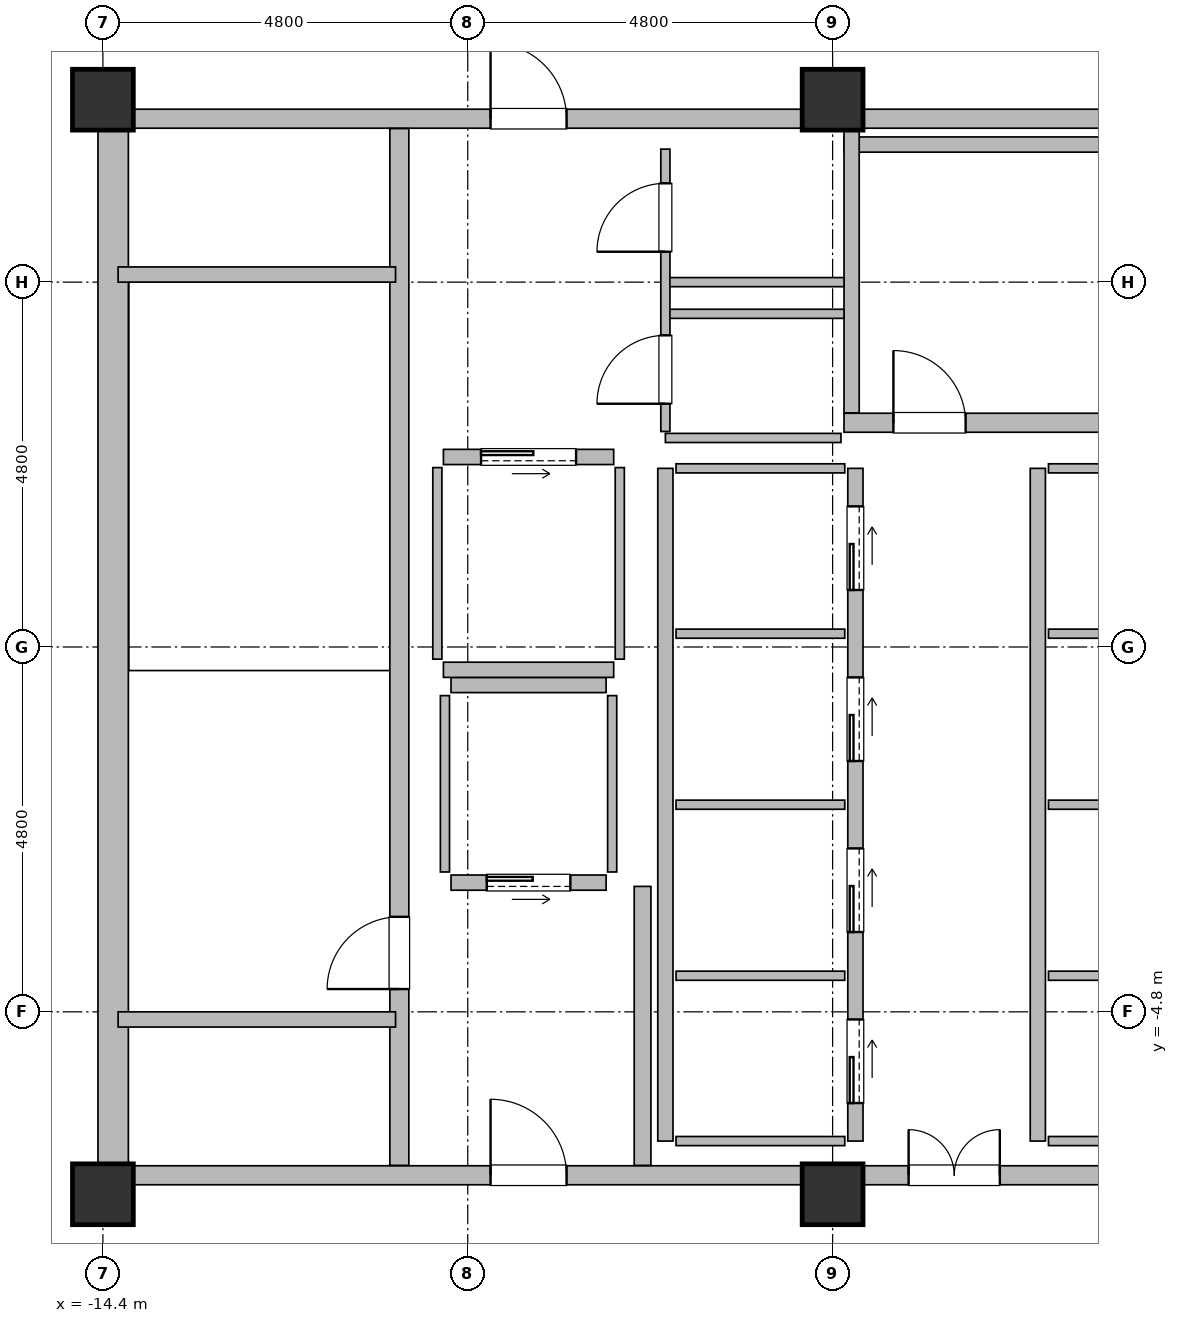
"""IFC4 building model, lengths in metres.
Left out: names, types, materials, properties, quantities, classifications, styles, units other than length and angle.
Written with IfcOpenShell. Run it as: python <this file> out.ifc"""

import sys

from ifc_helpers import new_model, si_unit, direction, frame, frame_2d, origin, origin_2d, place, context, subcontext, project, spatial, rectangle, hollow_rectangle, extrude, element, fill, save


model = new_model("IFC4")
c1 = context("Model", 3, precision=1e-05, world=origin(), true_north=direction((0.0, 1.0)))
c2 = subcontext(c1, "Body", "Model", "MODEL_VIEW")
j1 = project(units=[si_unit("LENGTHUNIT", "METRE"), si_unit("PLANEANGLEUNIT", "RADIAN")], contexts=[c1])
p1 = place(None, origin())
s1 = spatial("IfcSite", under=j1, at=p1, CompositionType="ELEMENT")
p2 = place(p1, origin())
s2 = spatial("IfcBuilding", under=s1, at=p2, CompositionType="ELEMENT")
p3 = place(p2, frame((0.0, 0.0, 48.5)))
s3 = spatial("IfcBuildingStorey", under=s2, at=p3, CompositionType="ELEMENT", Elevation=48.5)
for number, where, z_axis, x_axis in (
    (1, (-14.4, -7.2, 0.0), (0.0, 0.0, 1.0), (1.0, 0.0, 0.0)),
    (2, (-14.4, 7.2, 0.0), (0.0, 0.0, 1.0), (1.0, 0.0, 0.0)),
    (3, (-4.8, -7.2, 0.0), (0.0, 0.0, 1.0), (1.0, 0.0, 0.0)),
    (4, (-4.8, 7.2, 0.0), (0.0, 0.0, 1.0), (1.0, 0.0, 0.0)),
):
    element("IfcColumn", number, at=place(p3, frame(where, z_axis=z_axis, x_axis=x_axis)), inside=s3, PredefinedType="COLUMN", context=c2, shape_type="SweptSolid", body=[
        extrude(hollow_rectangle(XDim=0.8, YDim=0.8, WallThickness=0.036, at=origin_2d()), origin(), (0.0, 0.0, 1.0), 3.7),
    ])
p4 = place(p3, frame((-14.265, -7.2, -0.18), z_axis=(0.0, 0.0, 1.0), x_axis=(0.0, 1.0, 0.0)))
e5 = element("IfcWall", 5, at=p4, inside=s3, PredefinedType="SHEAR", context=c2, shape_type="SweptSolid", body=[
    extrude(rectangle(XDim=14.4, YDim=0.4, at=frame_2d((7.2, 0.0))), origin(), (0.0, 0.0, 1.0), 3.7),
])
p5 = place(p3, frame((-14.2, -6.95, 0.0), z_axis=(0.0, 0.0, 1.0), x_axis=(1.0, 0.0, 0.0)))
e6 = element("IfcWall", 6, at=p5, inside=s3, PredefinedType="SOLIDWALL", context=c2, shape_type="SweptSolid", body=[
    extrude(rectangle(XDim=9.4, YDim=0.25, at=frame_2d((4.7, 0.0))), origin(), (0.0, 0.0, 1.0), 2.62),
])
p6 = place(p5, frame((4.9, 0.0, 0.0)))
e7 = element("IfcOpeningElement", 7, at=p6, cuts=e6, PredefinedType="OPENING", context=c2, shape_type="SweptSolid", body=[
    extrude(rectangle(XDim=1.0, YDim=2.15, at=frame_2d((0.5, 1.075))), frame((0.0, 0.14, 0.0), z_axis=(0.0, -1.0, 0.0), x_axis=(1.0, 0.0, 0.0)), (0.0, 0.0, 1.0), 0.28),
])
p7 = place(p3, frame((-4.6, -6.95, 0.0), z_axis=(0.0, 0.0, 1.0), x_axis=(1.0, 0.0, 0.0)))
e8 = element("IfcWall", 8, at=p7, inside=s3, PredefinedType="SOLIDWALL", context=c2, shape_type="SweptSolid", body=[
    extrude(rectangle(XDim=9.2, YDim=0.25, at=frame_2d((4.6, 0.0))), origin(), (0.0, 0.0, 1.0), 2.32),
])
p8 = place(p7, frame((0.8, 0.0, 0.0)))
e9 = element("IfcOpeningElement", 9, at=p8, cuts=e8, PredefinedType="OPENING", context=c2, shape_type="SweptSolid", body=[
    extrude(rectangle(XDim=1.2, YDim=2.2, at=frame_2d((0.6, 1.1))), frame((0.0, 0.14, 0.0), z_axis=(0.0, -1.0, 0.0), x_axis=(1.0, 0.0, 0.0)), (0.0, 0.0, 1.0), 0.28),
])
p9 = place(p7, frame((5.55, 0.0, 0.0)))
e10 = element("IfcOpeningElement", 10, at=p9, cuts=e8, PredefinedType="OPENING", context=c2, shape_type="SweptSolid", body=[
    extrude(rectangle(XDim=1.2, YDim=2.2, at=frame_2d((0.6, 1.1))), frame((0.0, 0.14, 0.0), z_axis=(0.0, -1.0, 0.0), x_axis=(1.0, 0.0, 0.0)), (0.0, 0.0, 1.0), 0.28),
])
p10 = place(p3, frame((-14.2, 6.95, 0.0), z_axis=(0.0, 0.0, 1.0), x_axis=(1.0, 0.0, 0.0)))
e11 = element("IfcWall", 11, at=p10, inside=s3, PredefinedType="SOLIDWALL", context=c2, shape_type="SweptSolid", body=[
    extrude(rectangle(XDim=9.4, YDim=0.25, at=frame_2d((4.7, 0.0))), origin(), (0.0, 0.0, 1.0), 2.62),
])
p11 = place(p10, frame((4.9, 0.0, 0.0)))
e12 = element("IfcOpeningElement", 12, at=p11, cuts=e11, PredefinedType="OPENING", context=c2, shape_type="SweptSolid", body=[
    extrude(rectangle(XDim=1.0, YDim=2.15, at=frame_2d((0.5, 1.075))), frame((0.0, 0.14, 0.0), z_axis=(0.0, -1.0, 0.0), x_axis=(1.0, 0.0, 0.0)), (0.0, 0.0, 1.0), 0.28),
])
p12 = place(p3, frame((-4.6, 6.95, 0.0), z_axis=(0.0, 0.0, 1.0), x_axis=(1.0, 0.0, 0.0)))
e13 = element("IfcWall", 13, at=p12, inside=s3, PredefinedType="SOLIDWALL", context=c2, shape_type="SweptSolid", body=[
    extrude(rectangle(XDim=9.2, YDim=0.25, at=frame_2d((4.6, 0.0))), origin(), (0.0, 0.0, 1.0), 2.62),
])
p13 = place(p3, frame((-7.3, -6.82, 0.0), z_axis=(0.0, 0.0, 1.0), x_axis=(0.0, 1.0, 0.0)))
e14 = element("IfcWall", 14, at=p13, inside=s3, PredefinedType="SOLIDWALL", context=c2, shape_type="SweptSolid", body=[
    extrude(rectangle(XDim=3.67, YDim=0.22, at=frame_2d((1.835, 0.0))), origin(), (0.0, 0.0, 1.0), 2.62),
])
p14 = place(p3, frame((-10.5, -6.82, -0.18), z_axis=(0.0, 0.0, 1.0), x_axis=(0.0, 1.0, 0.0)))
e15 = element("IfcWall", 15, at=p14, inside=s3, PredefinedType="SOLIDWALL", context=c2, shape_type="SweptSolid", body=[
    extrude(rectangle(XDim=13.64, YDim=0.25, at=frame_2d((6.82, 0.0))), origin(), (0.0, 0.0, 1.0), 3.7),
])
p15 = place(p14, frame((2.32, 0.0, 0.18)))
e16 = element("IfcOpeningElement", 16, at=p15, cuts=e15, PredefinedType="OPENING", context=c2, shape_type="SweptSolid", body=[
    extrude(rectangle(XDim=0.95, YDim=2.15, at=frame_2d((0.475, 1.075))), frame((0.0, 0.14, 0.0), z_axis=(0.0, -1.0, 0.0), x_axis=(1.0, 0.0, 0.0)), (0.0, 0.0, 1.0), 0.28),
])
for number, where, z_axis, x_axis in (
    (17, (-14.2, -4.9, -0.18), (0.0, 0.0, 1.0), (1.0, 0.0, 0.0)),
    (18, (-14.2, 4.9, -0.18), (0.0, 0.0, 1.0), (1.0, 0.0, 0.0)),
):
    element("IfcWall", number, at=place(p3, frame(where, z_axis=z_axis, x_axis=x_axis)), inside=s3, PredefinedType="SOLIDWALL", context=c2, shape_type="SweptSolid", body=[
        extrude(rectangle(XDim=3.65, YDim=0.2, at=frame_2d((1.825, 0.0))), origin(), (0.0, 0.0, 1.0), 3.7),
    ])
p16 = place(p3, frame((-4.65, 2.95, -0.18), z_axis=(0.0, 0.0, 1.0), x_axis=(1.0, 0.0, 0.0)))
e19 = element("IfcWall", 19, at=p16, inside=s3, PredefinedType="SOLIDWALL", context=c2, shape_type="SweptSolid", body=[
    extrude(rectangle(XDim=9.9, YDim=0.25, at=frame_2d((4.95, 0.0))), origin(), (0.0, 0.0, 1.0), 3.7),
])
p17 = place(p16, frame((0.65, 0.0, 0.18)))
e20 = element("IfcOpeningElement", 20, at=p17, cuts=e19, PredefinedType="OPENING", context=c2, shape_type="SweptSolid", body=[
    extrude(rectangle(XDim=0.95, YDim=2.15, at=frame_2d((0.475, 1.075))), frame((0.0, 0.14, 0.0), z_axis=(0.0, -1.0, 0.0), x_axis=(1.0, 0.0, 0.0)), (0.0, 0.0, 1.0), 0.28),
])
p18 = place(p3, frame((-4.65, 6.61, -0.18), z_axis=(0.0, 0.0, 1.0), x_axis=(1.0, 0.0, 0.0)))
e21 = element("IfcWall", 21, at=p18, inside=s3, PredefinedType="SOLIDWALL", context=c2, shape_type="SweptSolid", body=[
    extrude(rectangle(XDim=9.9, YDim=0.2, at=frame_2d((4.95, 0.0))), origin(), (0.0, 0.0, 1.0), 3.7),
])
p19 = place(p3, frame((-4.55, 3.08, -0.18), z_axis=(0.0, 0.0, 1.0), x_axis=(0.0, 1.0, 0.0)))
e22 = element("IfcWall", 22, at=p19, inside=s3, PredefinedType="SOLIDWALL", context=c2, shape_type="SweptSolid", body=[
    extrude(rectangle(XDim=3.74, YDim=0.2, at=frame_2d((1.87, 0.0))), origin(), (0.0, 0.0, 1.0), 3.7),
])
p20 = place(p3, frame((-4.5, -6.5, 0.0), z_axis=(0.0, 0.0, 1.0), x_axis=(0.0, 1.0, 0.0)))
e23 = element("IfcWall", 23, at=p20, inside=s3, PredefinedType="SOLIDWALL", context=c2, shape_type="SweptSolid", body=[
    extrude(rectangle(XDim=8.85, YDim=0.2, at=frame_2d((4.425, 0.0))), origin(), (0.0, 0.0, 1.0), 3.52),
])
p21 = place(p20, frame((0.5, 0.0, 0.0)))
e24 = element("IfcOpeningElement", 24, at=p21, cuts=e23, PredefinedType="OPENING", context=c2, shape_type="SweptSolid", body=[
    extrude(rectangle(XDim=1.1, YDim=2.2, at=frame_2d((0.55, 1.1))), frame((0.0, 0.115, 0.0), z_axis=(0.0, -1.0, 0.0), x_axis=(1.0, 0.0, 0.0)), (0.0, 0.0, 1.0), 0.23),
])
p22 = place(p20, frame((2.75, 0.0, 0.0)))
e25 = element("IfcOpeningElement", 25, at=p22, cuts=e23, PredefinedType="OPENING", context=c2, shape_type="SweptSolid", body=[
    extrude(rectangle(XDim=1.1, YDim=2.2, at=frame_2d((0.55, 1.1))), frame((0.0, 0.115, 0.0), z_axis=(0.0, -1.0, 0.0), x_axis=(1.0, 0.0, 0.0)), (0.0, 0.0, 1.0), 0.23),
])
p23 = place(p20, frame((5.0, 0.0, 0.0)))
e26 = element("IfcOpeningElement", 26, at=p23, cuts=e23, PredefinedType="OPENING", context=c2, shape_type="SweptSolid", body=[
    extrude(rectangle(XDim=1.1, YDim=2.2, at=frame_2d((0.55, 1.1))), frame((0.0, 0.115, 0.0), z_axis=(0.0, -1.0, 0.0), x_axis=(1.0, 0.0, 0.0)), (0.0, 0.0, 1.0), 0.23),
])
p24 = place(p20, frame((7.25, 0.0, 0.0)))
e27 = element("IfcOpeningElement", 27, at=p24, cuts=e23, PredefinedType="OPENING", context=c2, shape_type="SweptSolid", body=[
    extrude(rectangle(XDim=1.1, YDim=2.2, at=frame_2d((0.55, 1.1))), frame((0.0, 0.115, 0.0), z_axis=(0.0, -1.0, 0.0), x_axis=(1.0, 0.0, 0.0)), (0.0, 0.0, 1.0), 0.23),
])
p25 = place(p3, frame((-7.0, -6.5, 0.0), z_axis=(0.0, 0.0, 1.0), x_axis=(0.0, 1.0, 0.0)))
e28 = element("IfcWall", 28, at=p25, inside=s3, PredefinedType="SOLIDWALL", context=c2, shape_type="SweptSolid", body=[
    extrude(rectangle(XDim=8.85, YDim=0.2, at=frame_2d((4.425, 0.0))), origin(), (0.0, 0.0, 1.0), 3.52),
])
for number, where, z_axis, x_axis in (
    (29, (-6.86, -6.5, 0.0), (0.0, 0.0, 1.0), (1.0, 0.0, 0.0)),
    (30, (-6.86, -4.325, 0.0), (0.0, 0.0, 1.0), (1.0, 0.0, 0.0)),
    (31, (-6.86, -2.075, 0.0), (0.0, 0.0, 1.0), (1.0, 0.0, 0.0)),
    (32, (-6.86, 0.175, 0.0), (0.0, 0.0, 1.0), (1.0, 0.0, 0.0)),
    (33, (-6.86, 2.35, 0.0), (0.0, 0.0, 1.0), (1.0, 0.0, 0.0)),
):
    element("IfcWall", number, at=place(p3, frame(where, z_axis=z_axis, x_axis=x_axis)), inside=s3, PredefinedType="PARTITIONING", context=c2, shape_type="SweptSolid", body=[
        extrude(rectangle(XDim=2.22, YDim=0.12, at=frame_2d((1.11, 0.0))), origin(), (0.0, 0.0, 1.0), 3.52),
    ])
p26 = place(p3, frame((-2.1, -6.5, 0.0), z_axis=(0.0, 0.0, 1.0), x_axis=(0.0, 1.0, 0.0)))
e34 = element("IfcWall", 34, at=p26, inside=s3, PredefinedType="SOLIDWALL", context=c2, shape_type="SweptSolid", body=[
    extrude(rectangle(XDim=8.85, YDim=0.2, at=frame_2d((4.425, 0.0))), origin(), (0.0, 0.0, 1.0), 3.52),
])
for number, where, z_axis, x_axis in (
    (35, (-1.96, -6.5, 0.0), (0.0, 0.0, 1.0), (1.0, 0.0, 0.0)),
    (36, (-1.96, -4.325, 0.0), (0.0, 0.0, 1.0), (1.0, 0.0, 0.0)),
    (37, (-1.96, -2.075, 0.0), (0.0, 0.0, 1.0), (1.0, 0.0, 0.0)),
    (38, (-1.96, 0.175, 0.0), (0.0, 0.0, 1.0), (1.0, 0.0, 0.0)),
    (39, (-1.96, 2.35, 0.0), (0.0, 0.0, 1.0), (1.0, 0.0, 0.0)),
):
    element("IfcWall", number, at=place(p3, frame(where, z_axis=z_axis, x_axis=x_axis)), inside=s3, PredefinedType="PARTITIONING", context=c2, shape_type="SweptSolid", body=[
        extrude(rectangle(XDim=2.22, YDim=0.12, at=frame_2d((1.11, 0.0))), origin(), (0.0, 0.0, 1.0), 3.52),
    ])
p27 = place(p3, frame((-9.82, -3.1, 0.0), z_axis=(0.0, 0.0, 1.0), x_axis=(1.0, 0.0, 0.0)))
e40 = element("IfcWall", 40, at=p27, inside=s3, PredefinedType="SOLIDWALL", context=c2, shape_type="SweptSolid", body=[
    extrude(rectangle(XDim=2.04, YDim=0.2, at=frame_2d((1.02, 0.0))), origin(), (0.0, 0.0, 1.0), 3.52),
])
p28 = place(p27, frame((0.47, 0.0, 0.0)))
e41 = element("IfcOpeningElement", 41, at=p28, cuts=e40, PredefinedType="OPENING", context=c2, shape_type="SweptSolid", body=[
    extrude(rectangle(XDim=1.1, YDim=2.2, at=frame_2d((0.55, 1.1))), frame((0.0, 0.115, 0.0), z_axis=(0.0, -1.0, 0.0), x_axis=(1.0, 0.0, 0.0)), (0.0, 0.0, 1.0), 0.23),
])
p29 = place(p3, frame((-9.82, -0.5, 0.0), z_axis=(0.0, 0.0, 1.0), x_axis=(1.0, 0.0, 0.0)))
e42 = element("IfcWall", 42, at=p29, inside=s3, PredefinedType="SOLIDWALL", context=c2, shape_type="SweptSolid", body=[
    extrude(rectangle(XDim=2.04, YDim=0.2, at=frame_2d((1.02, 0.0))), origin(), (0.0, 0.0, 1.0), 3.52),
])
for number, where, z_axis, x_axis in (
    (43, (-9.9, -2.96, 0.0), (0.0, 0.0, 1.0), (0.0, 1.0, 0.0)),
    (44, (-7.7, -2.96, 0.0), (0.0, 0.0, 1.0), (0.0, 1.0, 0.0)),
):
    element("IfcWall", number, at=place(p3, frame(where, z_axis=z_axis, x_axis=x_axis)), inside=s3, PredefinedType="PARTITIONING", context=c2, shape_type="SweptSolid", body=[
        extrude(rectangle(XDim=2.32, YDim=0.12, at=frame_2d((1.16, 0.0))), origin(), (0.0, 0.0, 1.0), 3.52),
    ])
p30 = place(p3, frame((-9.92, 2.5, 0.0), z_axis=(0.0, 0.0, 1.0), x_axis=(1.0, 0.0, 0.0)))
e45 = element("IfcWall", 45, at=p30, inside=s3, PredefinedType="SOLIDWALL", context=c2, shape_type="SweptSolid", body=[
    extrude(rectangle(XDim=2.24, YDim=0.2, at=frame_2d((1.12, 0.0))), origin(), (0.0, 0.0, 1.0), 3.52),
])
p31 = place(p30, frame((0.495, 0.0, 0.0)))
e46 = element("IfcOpeningElement", 46, at=p31, cuts=e45, PredefinedType="OPENING", context=c2, shape_type="SweptSolid", body=[
    extrude(rectangle(XDim=1.25, YDim=2.25, at=frame_2d((0.625, 1.125))), frame((0.0, 0.115, 0.0), z_axis=(0.0, -1.0, 0.0), x_axis=(1.0, 0.0, 0.0)), (0.0, 0.0, 1.0), 0.23),
])
p32 = place(p3, frame((-9.92, -0.3, 0.0), z_axis=(0.0, 0.0, 1.0), x_axis=(1.0, 0.0, 0.0)))
e47 = element("IfcWall", 47, at=p32, inside=s3, PredefinedType="SOLIDWALL", context=c2, shape_type="SweptSolid", body=[
    extrude(rectangle(XDim=2.24, YDim=0.2, at=frame_2d((1.12, 0.0))), origin(), (0.0, 0.0, 1.0), 3.52),
])
for number, where, z_axis, x_axis in (
    (48, (-10.0, -0.16, 0.0), (0.0, 0.0, 1.0), (0.0, 1.0, 0.0)),
    (49, (-7.6, -0.16, 0.0), (0.0, 0.0, 1.0), (0.0, 1.0, 0.0)),
):
    element("IfcWall", number, at=place(p3, frame(where, z_axis=z_axis, x_axis=x_axis)), inside=s3, PredefinedType="PARTITIONING", context=c2, shape_type="SweptSolid", body=[
        extrude(rectangle(XDim=2.52, YDim=0.12, at=frame_2d((1.26, 0.0))), origin(), (0.0, 0.0, 1.0), 3.52),
    ])
p33 = place(p3, frame((-7.0, 2.75, 0.0), z_axis=(0.0, 0.0, 1.0), x_axis=(1.0, 0.0, 0.0)))
e50 = element("IfcWall", 50, at=p33, inside=s3, PredefinedType="PARTITIONING", context=c2, shape_type="SweptSolid", body=[
    extrude(rectangle(XDim=2.31, YDim=0.12, at=frame_2d((1.155, 0.0))), origin(), (0.0, 0.0, 1.0), 3.52),
])
for number, where, z_axis, x_axis in (
    (51, (-7.0, 4.383, 0.0), (0.0, 0.0, 1.0), (1.0, 0.0, 0.0)),
    (52, (-7.0, 4.8, 0.0), (0.0, 0.0, 1.0), (1.0, 0.0, 0.0)),
):
    element("IfcWall", number, at=place(p3, frame(where, z_axis=z_axis, x_axis=x_axis)), inside=s3, PredefinedType="PARTITIONING", context=c2, shape_type="SweptSolid", body=[
        extrude(rectangle(XDim=2.35, YDim=0.12, at=frame_2d((1.175, 0.0))), origin(), (0.0, 0.0, 1.0), 3.52),
    ])
p34 = place(p3, frame((-7.0, 2.835, 0.0), z_axis=(0.0, 0.0, 1.0), x_axis=(0.0, 1.0, 0.0)))
e53 = element("IfcWall", 53, at=p34, inside=s3, PredefinedType="PARTITIONING", context=c2, shape_type="SweptSolid", body=[
    extrude(rectangle(XDim=3.715, YDim=0.12, at=frame_2d((1.857, 0.0))), origin(), (0.0, 0.0, 1.0), 3.52),
])
p35 = place(p34, frame((0.365, 0.0, 0.0)))
e54 = element("IfcOpeningElement", 54, at=p35, cuts=e53, PredefinedType="OPENING", context=c2, shape_type="SweptSolid", body=[
    extrude(rectangle(XDim=0.9, YDim=2.1, at=frame_2d((0.45, 1.05))), frame((0.0, 0.075, 0.0), z_axis=(0.0, -1.0, 0.0), x_axis=(1.0, 0.0, 0.0)), (0.0, 0.0, 1.0), 0.15),
])
p36 = place(p34, frame((2.365, 0.0, 0.0)))
e55 = element("IfcOpeningElement", 55, at=p36, cuts=e53, PredefinedType="OPENING", context=c2, shape_type="SweptSolid", body=[
    extrude(rectangle(XDim=0.9, YDim=2.1, at=frame_2d((0.45, 1.05))), frame((0.0, 0.075, 0.0), z_axis=(0.0, -1.0, 0.0), x_axis=(1.0, 0.0, 0.0)), (0.0, 0.0, 1.0), 0.15),
])
p37 = place(p6, origin())
e56 = element("IfcDoor", 56, at=p37, inside=s3, OperationType="SINGLE_SWING_RIGHT", PredefinedType="DOOR", context=c2, shape_type="SweptSolid", body=[
    extrude(rectangle(XDim=1.0, YDim=2.15, at=frame_2d((0.5, 1.075))), frame((0.0, 0.025, 0.0), z_axis=(0.0, -1.0, 0.0), x_axis=(1.0, 0.0, 0.0)), (0.0, 0.0, 1.0), 0.05),
])
fill(e7, e56)
p38 = place(p8, origin())
e57 = element("IfcDoor", 57, at=p38, inside=s3, OperationType="DOUBLE_DOOR_SINGLE_SWING", PredefinedType="DOOR", context=c2, shape_type="SweptSolid", body=[
    extrude(rectangle(XDim=1.2, YDim=2.2, at=frame_2d((0.6, 1.1))), frame((0.0, 0.025, 0.0), z_axis=(0.0, -1.0, 0.0), x_axis=(1.0, 0.0, 0.0)), (0.0, 0.0, 1.0), 0.05),
])
fill(e9, e57)
p39 = place(p11, origin())
e58 = element("IfcDoor", 58, at=p39, inside=s3, OperationType="SINGLE_SWING_LEFT", PredefinedType="DOOR", context=c2, shape_type="SweptSolid", body=[
    extrude(rectangle(XDim=1.0, YDim=2.15, at=frame_2d((0.5, 1.075))), frame((0.0, 0.025, 0.0), z_axis=(0.0, -1.0, 0.0), x_axis=(1.0, 0.0, 0.0)), (0.0, 0.0, 1.0), 0.05),
])
fill(e12, e58)
p40 = place(p15, origin())
e59 = element("IfcDoor", 59, at=p40, inside=s3, OperationType="SINGLE_SWING_LEFT", PredefinedType="DOOR", context=c2, shape_type="SweptSolid", body=[
    extrude(rectangle(XDim=0.95, YDim=2.15, at=frame_2d((0.475, 1.075))), frame((0.0, 0.025, 0.0), z_axis=(0.0, -1.0, 0.0), x_axis=(1.0, 0.0, 0.0)), (0.0, 0.0, 1.0), 0.05),
])
fill(e16, e59)
p41 = place(p17, origin())
e60 = element("IfcDoor", 60, at=p41, inside=s3, OperationType="SINGLE_SWING_RIGHT", PredefinedType="DOOR", context=c2, shape_type="SweptSolid", body=[
    extrude(rectangle(XDim=0.95, YDim=2.15, at=frame_2d((0.475, 1.075))), frame((0.0, 0.025, 0.0), z_axis=(0.0, -1.0, 0.0), x_axis=(1.0, 0.0, 0.0)), (0.0, 0.0, 1.0), 0.05),
])
fill(e20, e60)
p42 = place(p21, origin())
e61 = element("IfcDoor", 61, at=p42, inside=s3, OperationType="SLIDING_TO_LEFT", PredefinedType="DOOR", context=c2, shape_type="SweptSolid", body=[
    extrude(rectangle(XDim=1.1, YDim=2.2, at=frame_2d((0.55, 1.1))), frame((0.0, 0.025, 0.0), z_axis=(0.0, -1.0, 0.0), x_axis=(1.0, 0.0, 0.0)), (0.0, 0.0, 1.0), 0.05),
])
fill(e24, e61)
p43 = place(p22, origin())
e62 = element("IfcDoor", 62, at=p43, inside=s3, OperationType="SLIDING_TO_LEFT", PredefinedType="DOOR", context=c2, shape_type="SweptSolid", body=[
    extrude(rectangle(XDim=1.1, YDim=2.2, at=frame_2d((0.55, 1.1))), frame((0.0, 0.025, 0.0), z_axis=(0.0, -1.0, 0.0), x_axis=(1.0, 0.0, 0.0)), (0.0, 0.0, 1.0), 0.05),
])
fill(e25, e62)
p44 = place(p23, origin())
e63 = element("IfcDoor", 63, at=p44, inside=s3, OperationType="SLIDING_TO_LEFT", PredefinedType="DOOR", context=c2, shape_type="SweptSolid", body=[
    extrude(rectangle(XDim=1.1, YDim=2.2, at=frame_2d((0.55, 1.1))), frame((0.0, 0.025, 0.0), z_axis=(0.0, -1.0, 0.0), x_axis=(1.0, 0.0, 0.0)), (0.0, 0.0, 1.0), 0.05),
])
fill(e26, e63)
p45 = place(p24, origin())
e64 = element("IfcDoor", 64, at=p45, inside=s3, OperationType="SLIDING_TO_LEFT", PredefinedType="DOOR", context=c2, shape_type="SweptSolid", body=[
    extrude(rectangle(XDim=1.1, YDim=2.2, at=frame_2d((0.55, 1.1))), frame((0.0, 0.025, 0.0), z_axis=(0.0, -1.0, 0.0), x_axis=(1.0, 0.0, 0.0)), (0.0, 0.0, 1.0), 0.05),
])
fill(e27, e64)
p46 = place(p28, origin())
e65 = element("IfcDoor", 65, at=p46, inside=s3, OperationType="SLIDING_TO_LEFT", PredefinedType="DOOR", context=c2, shape_type="SweptSolid", body=[
    extrude(rectangle(XDim=1.1, YDim=2.2, at=frame_2d((0.55, 1.1))), frame((0.0, 0.025, 0.0), z_axis=(0.0, -1.0, 0.0), x_axis=(1.0, 0.0, 0.0)), (0.0, 0.0, 1.0), 0.05),
])
fill(e41, e65)
p47 = place(p31, origin())
e66 = element("IfcDoor", 66, at=p47, inside=s3, OperationType="SLIDING_TO_LEFT", PredefinedType="DOOR", context=c2, shape_type="SweptSolid", body=[
    extrude(rectangle(XDim=1.25, YDim=2.25, at=frame_2d((0.625, 1.125))), frame((0.0, 0.025, 0.0), z_axis=(0.0, -1.0, 0.0), x_axis=(1.0, 0.0, 0.0)), (0.0, 0.0, 1.0), 0.05),
])
fill(e46, e66)
p48 = place(p35, origin())
e67 = element("IfcDoor", 67, at=p48, inside=s3, OperationType="SINGLE_SWING_RIGHT", PredefinedType="DOOR", context=c2, shape_type="SweptSolid", body=[
    extrude(rectangle(XDim=0.9, YDim=2.1, at=frame_2d((0.45, 1.05))), frame((0.0, 0.025, 0.0), z_axis=(0.0, -1.0, 0.0), x_axis=(1.0, 0.0, 0.0)), (0.0, 0.0, 1.0), 0.05),
])
fill(e54, e67)
p49 = place(p36, origin())
e68 = element("IfcDoor", 68, at=p49, inside=s3, OperationType="SINGLE_SWING_RIGHT", PredefinedType="DOOR", context=c2, shape_type="SweptSolid", body=[
    extrude(rectangle(XDim=0.9, YDim=2.1, at=frame_2d((0.45, 1.05))), frame((0.0, 0.025, 0.0), z_axis=(0.0, -1.0, 0.0), x_axis=(1.0, 0.0, 0.0)), (0.0, 0.0, 1.0), 0.05),
])
fill(e55, e68)
save(model, sys.argv[1])
